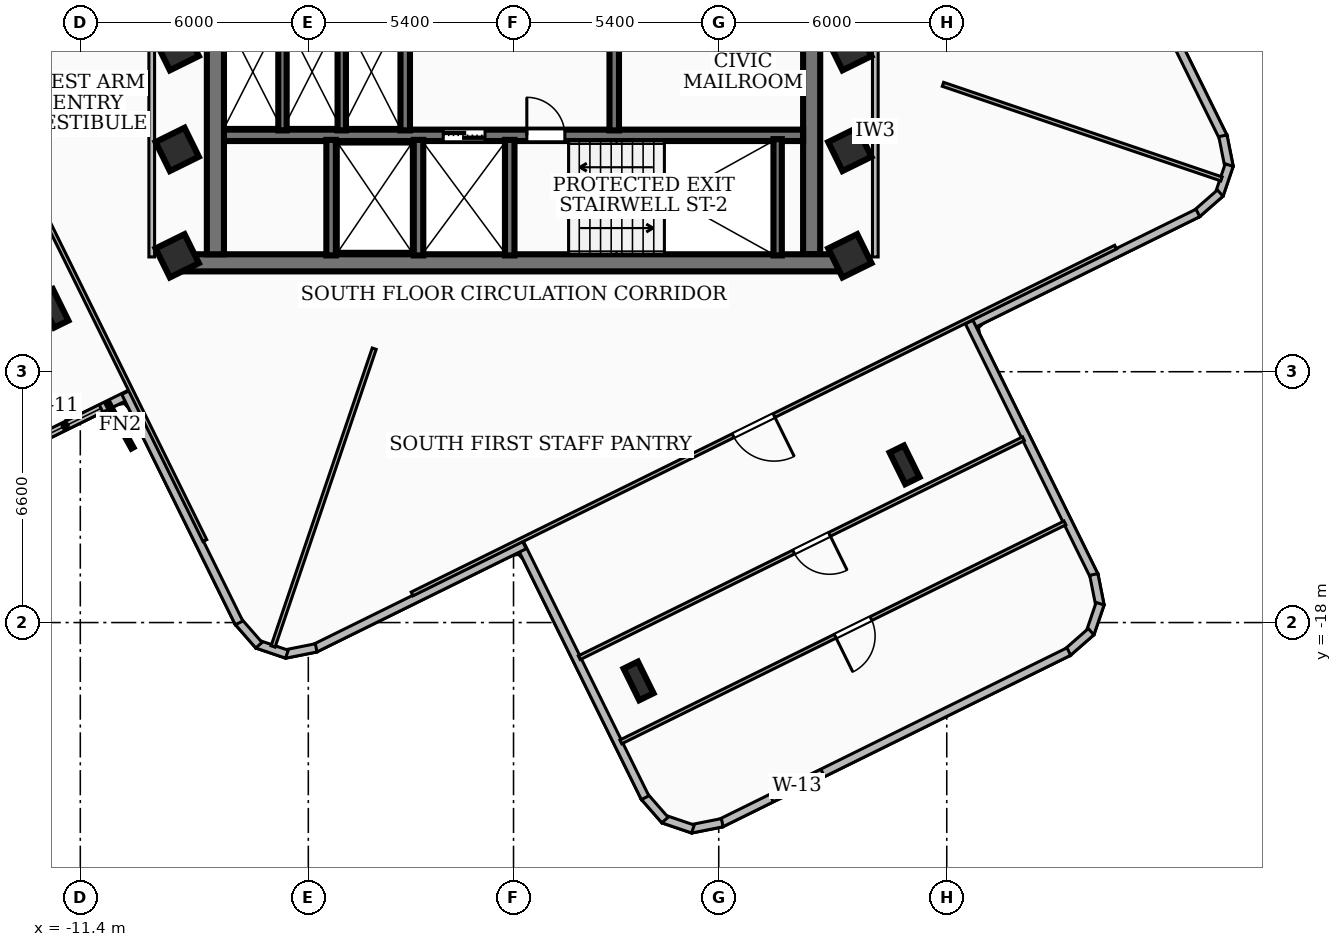
"""IFC4 building model, lengths in metres.
Left out: names, types, materials, properties, quantities, classifications, styles, units other than length and angle.
Written with IfcOpenShell. Run it as: python <this file> out.ifc"""

import sys

from ifc_helpers import new_model, si_unit, direction, frame, frame_2d, origin, origin_2d, place, context, subcontext, project, spatial, rectangle, i_section, extrude, element, fill, save


model = new_model("IFC4")
c1 = context("Model", 3, precision=1e-05, world=origin(), true_north=direction((0.0, 1.0)))
c2 = subcontext(c1, "Body", "Model", "MODEL_VIEW")
j1 = project(units=[si_unit("LENGTHUNIT", "METRE"), si_unit("PLANEANGLEUNIT", "RADIAN")], contexts=[c1])
p1 = place(None, origin())
s1 = spatial("IfcSite", under=j1, at=p1, CompositionType="ELEMENT")
p2 = place(p1, origin())
s2 = spatial("IfcBuilding", under=s1, at=p2, CompositionType="ELEMENT")
p3 = place(p2, frame((0.0, 0.0, 192.6)))
s3 = spatial("IfcBuildingStorey", under=s2, at=p3, CompositionType="ELEMENT", Elevation=192.6)
p4 = place(p3, frame((8.78, -8.535, 0.0), z_axis=(0.0, 0.0, 1.0), x_axis=(-1.0, 0.0, 0.0)))
e1 = element("IfcWall", 1, at=p4, inside=s3, PredefinedType="SHEAR", context=c2, shape_type="SweptSolid", body=[
    extrude(rectangle(XDim=17.56, YDim=0.45, at=frame_2d((8.78, 0.0))), origin(), (0.0, 0.0, 1.0), 3.2),
])
for number, where, z_axis, x_axis in (
    (2, (-7.845, -8.31, 0.0), (0.0, 0.0, 1.0), (0.0, 1.0, 0.0)),
    (3, (7.845, -1.975, 0.0), (0.0, 0.0, 1.0), (0.0, -1.0, 0.0)),
):
    element("IfcWall", number, at=place(p3, frame(where, z_axis=z_axis, x_axis=x_axis)), inside=s3, PredefinedType="SHEAR", context=c2, shape_type="SweptSolid", body=[
        extrude(rectangle(XDim=6.335, YDim=0.45, at=frame_2d((3.167, 0.0))), origin(), (0.0, 0.0, 1.0), 3.2),
    ])
p5 = place(p3, frame((-7.62, -5.18, 0.0), z_axis=(0.0, 0.0, 1.0), x_axis=(1.0, 0.0, 0.0)))
e4 = element("IfcWall", 4, at=p5, inside=s3, PredefinedType="SOLIDWALL", context=c2, shape_type="SweptSolid", body=[
    extrude(rectangle(XDim=15.24, YDim=0.3, at=frame_2d((7.62, 0.0))), origin(), (0.0, 0.0, 1.0), 3.2),
])
p6 = place(p5, frame((5.77, 0.0, 0.0)))
e5 = element("IfcOpeningElement", 5, at=p6, cuts=e4, PredefinedType="OPENING", context=c2, shape_type="SweptSolid", body=[
    extrude(rectangle(XDim=1.1, YDim=2.15, at=frame_2d((0.55, 1.075))), frame((0.0, 0.16, 0.0), z_axis=(0.0, -1.0, 0.0), x_axis=(1.0, 0.0, 0.0)), (0.0, 0.0, 1.0), 0.32),
])
p7 = place(p5, frame((7.97, 0.0, 0.0)))
e6 = element("IfcOpeningElement", 6, at=p7, cuts=e4, PredefinedType="OPENING", context=c2, shape_type="SweptSolid", body=[
    extrude(rectangle(XDim=1.0, YDim=2.1, at=frame_2d((0.5, 1.05))), frame((0.0, 0.16, 0.0), z_axis=(0.0, -1.0, 0.0), x_axis=(1.0, 0.0, 0.0)), (0.0, 0.0, 1.0), 0.32),
])
p8 = place(p3, frame((6.95, -8.34, 0.0), z_axis=(0.0, 0.0, 1.0), x_axis=(0.0, 1.0, 0.0)))
e7 = element("IfcWall", 7, at=p8, inside=s3, PredefinedType="SOLIDWALL", context=c2, shape_type="SweptSolid", body=[
    extrude(rectangle(XDim=3.06, YDim=0.22, at=frame_2d((1.53, 0.0))), origin(), (0.0, 0.0, 1.0), 3.2),
])
for number, where, z_axis, x_axis in (
    (8, (-0.1, -8.34, 0.0), (0.0, 0.0, 1.0), (0.0, 1.0, 0.0)),
    (9, (-2.5, -8.34, 0.0), (0.0, 0.0, 1.0), (0.0, 1.0, 0.0)),
    (10, (-4.8, -8.34, 0.0), (0.0, 0.0, 1.0), (0.0, 1.0, 0.0)),
):
    element("IfcWall", number, at=place(p3, frame(where, z_axis=z_axis, x_axis=x_axis)), inside=s3, PredefinedType="SOLIDWALL", context=c2, shape_type="SweptSolid", body=[
        extrude(rectangle(XDim=3.04, YDim=0.25, at=frame_2d((1.52, 0.0))), origin(), (0.0, 0.0, 1.0), 3.2),
    ])
for number, where, z_axis, x_axis in (
    (11, (-2.85, -5.05, 0.0), (0.0, 0.0, 1.0), (0.0, 1.0, 0.0)),
    (12, (2.65, -5.05, 0.0), (0.0, 0.0, 1.0), (0.0, 1.0, 0.0)),
):
    element("IfcWall", number, at=place(p3, frame(where, z_axis=z_axis, x_axis=x_axis)), inside=s3, PredefinedType="SOLIDWALL", context=c2, shape_type="SweptSolid", body=[
        extrude(rectangle(XDim=3.07, YDim=0.25, at=frame_2d((1.535, 0.0))), origin(), (0.0, 0.0, 1.0), 3.2),
    ])
for number, where, z_axis, x_axis in (
    (13, (-6.08, -5.05, 0.0), (0.0, 0.0, 1.0), (0.0, 1.0, 0.0)),
    (14, (-4.52, -5.05, 0.0), (0.0, 0.0, 1.0), (0.0, 1.0, 0.0)),
):
    element("IfcWall", number, at=place(p3, frame(where, z_axis=z_axis, x_axis=x_axis)), inside=s3, PredefinedType="SOLIDWALL", context=c2, shape_type="SweptSolid", body=[
        extrude(rectangle(XDim=3.07, YDim=0.22, at=frame_2d((1.535, 0.0))), origin(), (0.0, 0.0, 1.0), 3.2),
    ])
for number, where, z_axis, x_axis in (
    (15, (-8.85, -5.55, 0.0), (0.0, 0.0, 1.0), (0.897, 0.442, 0.0)),
    (16, (-8.85, -2.9, 0.0), (0.0, 0.0, 1.0), (0.897, 0.442, 0.0)),
    (17, (8.85, -5.55, 0.0), (0.0, 0.0, 1.0), (0.897, 0.442, 0.0)),
    (18, (8.85, -2.9, 0.0), (0.0, 0.0, 1.0), (0.897, 0.442, 0.0)),
    (19, (8.85, -8.35, 0.0), (0.0, 0.0, 1.0), (0.897, 0.442, 0.0)),
    (20, (-8.85, -8.35, 0.0), (0.0, 0.0, 1.0), (0.897, 0.442, 0.0)),
):
    element("IfcColumn", number, at=place(p3, frame(where, z_axis=z_axis, x_axis=x_axis)), inside=s3, PredefinedType="COLUMN", context=c2, shape_type="SweptSolid", body=[
        extrude(rectangle(XDim=0.85, YDim=0.85, at=origin_2d()), origin(), (0.0, 0.0, 1.0), 3.6),
    ])
for number, where, z_axis, x_axis in (
    (21, (-12.106, -9.731, 0.0), (0.0, 0.0, 1.0), (0.897, 0.442, 0.0)),
    (22, (3.29, -19.536, 0.0), (0.0, 0.0, 1.0), (0.897, 0.442, 0.0)),
    (23, (10.29, -13.85, 0.0), (0.0, 0.0, 1.0), (0.897, 0.442, 0.0)),
):
    element("IfcColumn", number, at=place(p3, frame(where, z_axis=z_axis, x_axis=x_axis)), inside=s3, PredefinedType="COLUMN", context=c2, shape_type="SweptSolid", body=[
        extrude(i_section(OverallWidth=0.418, OverallDepth=0.927, WebThickness=0.019, FlangeThickness=0.032, at=origin_2d()), origin(), (0.0, 0.0, 1.0), 3.6),
    ])
p9 = place(p3, frame((-10.092, -11.988, 0.0), z_axis=(0.0, 0.0, 1.0), x_axis=(-0.89699971925, -0.442031111649, 0.0)))
e24 = element("IfcWall", 24, at=p9, inside=s3, PredefinedType="SOLIDWALL", context=c2, shape_type="SweptSolid", body=[
    extrude(rectangle(XDim=9.058, YDim=0.22, at=frame_2d((4.529, 0.0))), origin(), (0.0, 0.0, 1.0), 3.2),
])
p10 = place(p9, frame((0.85, 0.0, 0.85)))
e25 = element("IfcOpeningElement", 25, at=p10, cuts=e24, PredefinedType="OPENING", context=c2, shape_type="SweptSolid", body=[
    extrude(rectangle(XDim=2.1, YDim=1.6, at=frame_2d((1.05, 0.8))), frame((0.0, 0.12, 0.0), z_axis=(0.0, -1.0, 0.0), x_axis=(1.0, 0.0, 0.0)), (0.0, 0.0, 1.0), 0.24),
])
p11 = place(p3, frame((15.96, 0.284, 0.0), z_axis=(0.0, 0.0, 1.0), x_axis=(0.442004580174, -0.897012793167, 0.0)))
e26 = element("IfcWall", 26, at=p11, inside=s3, PredefinedType="SOLIDWALL", context=c2, shape_type="SweptSolid", body=[
    extrude(rectangle(XDim=6.158, YDim=0.22, at=frame_2d((3.079, 0.0))), origin(), (0.0, 0.0, 1.0), 3.2),
])
p12 = place(p3, frame((18.666, -5.193, 0.0), z_axis=(0.0, 0.0, 1.0), x_axis=(0.19532881852, -0.980737810353, 0.0)))
e27 = element("IfcWall", 27, at=p12, inside=s3, PredefinedType="SOLIDWALL", context=c2, shape_type="SweptSolid", body=[
    extrude(rectangle(XDim=0.835, YDim=0.22, at=frame_2d((0.417, 0.0))), origin(), (0.0, 0.0, 1.0), 3.2),
])
p13 = place(p3, frame((18.832, -5.963, 0.0), z_axis=(0.0, 0.0, 1.0), x_axis=(-0.320509908962, -0.947245162699, 0.0)))
e28 = element("IfcWall", 28, at=p13, inside=s3, PredefinedType="SOLIDWALL", context=c2, shape_type="SweptSolid", body=[
    extrude(rectangle(XDim=0.82, YDim=0.22, at=frame_2d((0.41, 0.0))), origin(), (0.0, 0.0, 1.0), 3.2),
])
p14 = place(p3, frame((18.596, -6.7, 0.0), z_axis=(0.0, 0.0, 1.0), x_axis=(-0.752794227209, -0.658255916404, 0.0)))
e29 = element("IfcWall", 29, at=p14, inside=s3, PredefinedType="SOLIDWALL", context=c2, shape_type="SweptSolid", body=[
    extrude(rectangle(XDim=0.834, YDim=0.22, at=frame_2d((0.417, 0.0))), origin(), (0.0, 0.0, 1.0), 3.2),
])
p15 = place(p3, frame((18.009, -7.222, 0.0), z_axis=(0.0, 0.0, 1.0), x_axis=(-0.896927600032, -0.44217743079, 0.0)))
e30 = element("IfcWall", 30, at=p15, inside=s3, PredefinedType="SOLIDWALL", context=c2, shape_type="SweptSolid", body=[
    extrude(rectangle(XDim=6.758, YDim=0.22, at=frame_2d((3.379, 0.0))), origin(), (0.0, 0.0, 1.0), 3.2),
])
p16 = place(p3, frame((11.988, -10.092, 0.0), z_axis=(0.0, 0.0, 1.0), x_axis=(0.442047193251, -0.896991794243, 0.0)))
e31 = element("IfcWall", 31, at=p16, inside=s3, PredefinedType="SOLIDWALL", context=c2, shape_type="SweptSolid", body=[
    extrude(rectangle(XDim=7.458, YDim=0.22, at=frame_2d((3.729, 0.0))), origin(), (0.0, 0.0, 1.0), 3.2),
])
p17 = place(p3, frame((15.269, -16.735, 0.0), z_axis=(0.0, 0.0, 1.0), x_axis=(0.195047542382, -0.980793788832, 0.0)))
e32 = element("IfcWall", 32, at=p17, inside=s3, PredefinedType="SOLIDWALL", context=c2, shape_type="SweptSolid", body=[
    extrude(rectangle(XDim=0.835, YDim=0.22, at=frame_2d((0.417, 0.0))), origin(), (0.0, 0.0, 1.0), 3.2),
])
p18 = place(p3, frame((15.435, -17.505, 0.0), z_axis=(0.0, 0.0, 1.0), x_axis=(-0.322207018103, -0.94666923341, 0.0)))
e33 = element("IfcWall", 33, at=p18, inside=s3, PredefinedType="SOLIDWALL", context=c2, shape_type="SweptSolid", body=[
    extrude(rectangle(XDim=0.82, YDim=0.22, at=frame_2d((0.41, 0.0))), origin(), (0.0, 0.0, 1.0), 3.2),
])
p19 = place(p3, frame((15.198, -18.241, 0.0), z_axis=(0.0, 0.0, 1.0), x_axis=(-0.752286267629, -0.658836376907, 0.0)))
e34 = element("IfcWall", 34, at=p19, inside=s3, PredefinedType="SOLIDWALL", context=c2, shape_type="SweptSolid", body=[
    extrude(rectangle(XDim=0.833, YDim=0.22, at=frame_2d((0.417, 0.0))), origin(), (0.0, 0.0, 1.0), 3.2),
])
p20 = place(p3, frame((14.612, -18.763, 0.0), z_axis=(0.0, 0.0, 1.0), x_axis=(-0.896935503829, -0.442161398101, 0.0)))
e35 = element("IfcWall", 35, at=p20, inside=s3, PredefinedType="SOLIDWALL", context=c2, shape_type="SweptSolid", body=[
    extrude(rectangle(XDim=10.22, YDim=0.22, at=frame_2d((5.11, 0.0))), origin(), (0.0, 0.0, 1.0), 3.2),
])
p21 = place(p20, frame((7.222, 0.0, 0.85)))
e36 = element("IfcOpeningElement", 36, at=p21, cuts=e35, PredefinedType="OPENING", context=c2, shape_type="SweptSolid", body=[
    extrude(rectangle(XDim=1.5, YDim=1.8, at=frame_2d((0.75, 0.9))), frame((0.0, 0.12, 0.0), z_axis=(0.0, -1.0, 0.0), x_axis=(1.0, 0.0, 0.0)), (0.0, 0.0, 1.0), 0.24),
])
p22 = place(p3, frame((5.492, -23.266, 0.0), z_axis=(0.0, 0.0, 1.0), x_axis=(-0.980838211919, -0.194824028395, 0.0)))
e37 = element("IfcWall", 37, at=p22, inside=s3, PredefinedType="SOLIDWALL", context=c2, shape_type="SweptSolid", body=[
    extrude(rectangle(XDim=0.836, YDim=0.22, at=frame_2d((0.418, 0.0))), origin(), (0.0, 0.0, 1.0), 3.2),
])
p23 = place(p3, frame((4.721, -23.432, 0.0), z_axis=(0.0, 0.0, 1.0), x_axis=(-0.94709198428, 0.320962261507, 0.0)))
e38 = element("IfcWall", 38, at=p23, inside=s3, PredefinedType="SOLIDWALL", context=c2, shape_type="SweptSolid", body=[
    extrude(rectangle(XDim=0.819, YDim=0.22, at=frame_2d((0.41, 0.0))), origin(), (0.0, 0.0, 1.0), 3.2),
])
p24 = place(p3, frame((3.985, -23.196, 0.0), z_axis=(0.0, 0.0, 1.0), x_axis=(-0.658255916404, 0.752794227209, 0.0)))
e39 = element("IfcWall", 39, at=p24, inside=s3, PredefinedType="SOLIDWALL", context=c2, shape_type="SweptSolid", body=[
    extrude(rectangle(XDim=0.834, YDim=0.22, at=frame_2d((0.417, 0.0))), origin(), (0.0, 0.0, 1.0), 3.2),
])
p25 = place(p3, frame((3.463, -22.609, 0.0), z_axis=(0.0, 0.0, 1.0), x_axis=(-0.442099117248, 0.896966203671, 0.0)))
e40 = element("IfcWall", 40, at=p25, inside=s3, PredefinedType="SOLIDWALL", context=c2, shape_type="SweptSolid", body=[
    extrude(rectangle(XDim=7.457, YDim=0.22, at=frame_2d((3.729, 0.0))), origin(), (0.0, 0.0, 1.0), 3.2),
])
p26 = place(p3, frame((0.284, -15.96, 0.0), z_axis=(0.0, 0.0, 1.0), x_axis=(-0.897012793167, -0.442004580174, 0.0)))
e41 = element("IfcWall", 41, at=p26, inside=s3, PredefinedType="SOLIDWALL", context=c2, shape_type="SweptSolid", body=[
    extrude(rectangle(XDim=6.158, YDim=0.22, at=frame_2d((3.079, 0.0))), origin(), (0.0, 0.0, 1.0), 3.2),
])
p27 = place(p3, frame((-5.193, -18.666, 0.0), z_axis=(0.0, 0.0, 1.0), x_axis=(-0.980737810353, -0.19532881852, 0.0)))
e42 = element("IfcWall", 42, at=p27, inside=s3, PredefinedType="SOLIDWALL", context=c2, shape_type="SweptSolid", body=[
    extrude(rectangle(XDim=0.835, YDim=0.22, at=frame_2d((0.417, 0.0))), origin(), (0.0, 0.0, 1.0), 3.2),
])
p28 = place(p3, frame((-5.963, -18.832, 0.0), z_axis=(0.0, 0.0, 1.0), x_axis=(-0.947245162699, 0.320509908962, 0.0)))
e43 = element("IfcWall", 43, at=p28, inside=s3, PredefinedType="SOLIDWALL", context=c2, shape_type="SweptSolid", body=[
    extrude(rectangle(XDim=0.82, YDim=0.22, at=frame_2d((0.41, 0.0))), origin(), (0.0, 0.0, 1.0), 3.2),
])
p29 = place(p3, frame((-6.7, -18.596, 0.0), z_axis=(0.0, 0.0, 1.0), x_axis=(-0.658255916404, 0.752794227209, 0.0)))
e44 = element("IfcWall", 44, at=p29, inside=s3, PredefinedType="SOLIDWALL", context=c2, shape_type="SweptSolid", body=[
    extrude(rectangle(XDim=0.834, YDim=0.22, at=frame_2d((0.417, 0.0))), origin(), (0.0, 0.0, 1.0), 3.2),
])
p30 = place(p3, frame((-7.222, -18.009, 0.0), z_axis=(0.0, 0.0, 1.0), x_axis=(-0.44217743079, 0.896927600032, 0.0)))
e45 = element("IfcWall", 45, at=p30, inside=s3, PredefinedType="SOLIDWALL", context=c2, shape_type="SweptSolid", body=[
    extrude(rectangle(XDim=6.758, YDim=0.22, at=frame_2d((3.379, 0.0))), origin(), (0.0, 0.0, 1.0), 3.2),
])
p31 = place(p3, frame((-9.52, -8.38, 0.0), z_axis=(0.0, 0.0, 1.0), x_axis=(0.0, 1.0, 0.0)))
e46 = element("IfcWall", 46, at=p31, inside=s3, PredefinedType="PARTITIONING", context=c2, shape_type="SweptSolid", body=[
    extrude(rectangle(XDim=6.63, YDim=0.15, at=frame_2d((3.315, 0.0))), origin(), (0.0, 0.0, 1.0), 2.504),
])
p32 = place(p3, frame((9.52, -8.38, 0.0), z_axis=(0.0, 0.0, 1.0), x_axis=(0.0, 1.0, 0.0)))
e47 = element("IfcWall", 47, at=p32, inside=s3, PredefinedType="PARTITIONING", context=c2, shape_type="SweptSolid", body=[
    extrude(rectangle(XDim=6.63, YDim=0.15, at=frame_2d((3.315, 0.0))), origin(), (0.0, 0.0, 1.0), 3.2),
])
p33 = place(p3, frame((-3.666, -10.794, 0.0), z_axis=(0.0, 0.0, 1.0), x_axis=(-0.32157793417, -0.946883114357, 0.0)))
e48 = element("IfcWall", 48, at=p33, inside=s3, PredefinedType="PARTITIONING", context=c2, shape_type="SweptSolid", body=[
    extrude(rectangle(XDim=8.274, YDim=0.11, at=frame_2d((4.137, 0.0))), origin(), (0.0, 0.0, 1.0), 3.2),
])
p34 = place(p3, frame((11.3, -3.838, 0.0), z_axis=(0.0, 0.0, 1.0), x_axis=(0.946882857271, -0.321578691158, 0.0)))
e49 = element("IfcWall", 49, at=p34, inside=s3, PredefinedType="PARTITIONING", context=c2, shape_type="SweptSolid", body=[
    extrude(rectangle(XDim=7.74, YDim=0.11, at=frame_2d((3.87, 0.0))), origin(), (0.0, 0.0, 1.0), 3.2),
])
p35 = place(p3, frame((-8.122, -15.843, 0.0), z_axis=(0.0, 0.0, 1.0), x_axis=(-0.442129285211, 0.896951333774, 0.0)))
e50 = element("IfcWall", 50, at=p35, inside=s3, PredefinedType="PARTITIONING", context=c2, shape_type="SweptSolid", body=[
    extrude(rectangle(XDim=20.639, YDim=0.11, at=frame_2d((10.319, 0.0))), origin(), (0.0, 0.0, 1.0), 2.504),
])
p36 = place(p35, frame((10.02, 0.0, 0.0)))
e51 = element("IfcOpeningElement", 51, at=p36, cuts=e50, PredefinedType="OPENING", context=c2, shape_type="SweptSolid", body=[
    extrude(rectangle(XDim=1.2, YDim=2.1, at=frame_2d((0.6, 1.05))), frame((0.0, 0.065, 0.0), z_axis=(0.0, -1.0, 0.0), x_axis=(1.0, 0.0, 0.0)), (0.0, 0.0, 1.0), 0.13),
])
p37 = place(p3, frame((15.843, -8.122, 0.0), z_axis=(0.0, 0.0, 1.0), x_axis=(-0.896951333774, -0.442129285211, 0.0)))
e52 = element("IfcWall", 52, at=p37, inside=s3, PredefinedType="PARTITIONING", context=c2, shape_type="SweptSolid", body=[
    extrude(rectangle(XDim=20.639, YDim=0.11, at=frame_2d((10.319, 0.0))), origin(), (0.0, 0.0, 1.0), 2.504),
])
p38 = place(p37, frame((10.02, 0.0, 0.0)))
e53 = element("IfcOpeningElement", 53, at=p38, cuts=e52, PredefinedType="OPENING", context=c2, shape_type="SweptSolid", body=[
    extrude(rectangle(XDim=1.2, YDim=2.1, at=frame_2d((0.6, 1.05))), frame((0.0, 0.065, 0.0), z_axis=(0.0, -1.0, 0.0), x_axis=(1.0, 0.0, 0.0)), (0.0, 0.0, 1.0), 0.13),
])
p39 = place(p3, frame((13.418, -13.164, 0.0), z_axis=(0.0, 0.0, 1.0), x_axis=(-0.896946100231, -0.442139902385, 0.0)))
e54 = element("IfcWall", 54, at=p39, inside=s3, PredefinedType="PARTITIONING", context=c2, shape_type="SweptSolid", body=[
    extrude(rectangle(XDim=13.03, YDim=0.11, at=frame_2d((6.515, 0.0))), origin(), (0.0, 0.0, 1.0), 2.504),
])
p40 = place(p39, frame((5.69, 0.0, 0.0)))
e55 = element("IfcOpeningElement", 55, at=p40, cuts=e54, PredefinedType="OPENING", context=c2, shape_type="SweptSolid", body=[
    extrude(rectangle(XDim=1.05, YDim=2.08, at=frame_2d((0.525, 1.04))), frame((0.0, 0.065, 0.0), z_axis=(0.0, -1.0, 0.0), x_axis=(1.0, 0.0, 0.0)), (0.0, 0.0, 1.0), 0.13),
])
p41 = place(p3, frame((14.51, -15.379, 0.0), z_axis=(0.0, 0.0, 1.0), x_axis=(-0.896946100231, -0.442139902385, 0.0)))
e56 = element("IfcWall", 56, at=p41, inside=s3, PredefinedType="PARTITIONING", context=c2, shape_type="SweptSolid", body=[
    extrude(rectangle(XDim=13.03, YDim=0.11, at=frame_2d((6.515, 0.0))), origin(), (0.0, 0.0, 1.0), 3.2),
])
p42 = place(p41, frame((5.69, 0.0, 0.0)))
e57 = element("IfcOpeningElement", 57, at=p42, cuts=e56, PredefinedType="OPENING", context=c2, shape_type="SweptSolid", body=[
    extrude(rectangle(XDim=1.05, YDim=2.08, at=frame_2d((0.525, 1.04))), frame((0.0, 0.065, 0.0), z_axis=(0.0, -1.0, 0.0), x_axis=(1.0, 0.0, 0.0)), (0.0, 0.0, 1.0), 0.13),
])
p43 = place(p10, origin())
e58 = element("IfcWindow", 58, at=p43, inside=s3, PartitioningType="SINGLE_PANEL", PredefinedType="WINDOW", context=c2, shape_type="SweptSolid", body=[
    extrude(rectangle(XDim=2.1, YDim=1.6, at=frame_2d((1.05, 0.8))), frame((0.0, 0.03, 0.0), z_axis=(0.0, -1.0, 0.0), x_axis=(1.0, 0.0, 0.0)), (0.0, 0.0, 1.0), 0.06),
])
fill(e25, e58)
p44 = place(p21, origin())
e59 = element("IfcWindow", 59, at=p44, inside=s3, PartitioningType="SINGLE_PANEL", PredefinedType="WINDOW", context=c2, shape_type="SweptSolid", body=[
    extrude(rectangle(XDim=1.5, YDim=1.8, at=frame_2d((0.75, 0.9))), frame((0.0, 0.03, 0.0), z_axis=(0.0, -1.0, 0.0), x_axis=(1.0, 0.0, 0.0)), (0.0, 0.0, 1.0), 0.06),
])
fill(e36, e59)
p45 = place(p6, origin())
e60 = element("IfcDoor", 60, at=p45, inside=s3, OperationType="DOUBLE_DOOR_SLIDING", PredefinedType="DOOR", context=c2, shape_type="SweptSolid", body=[
    extrude(rectangle(XDim=1.1, YDim=2.15, at=frame_2d((0.55, 1.075))), frame((0.0, 0.025, 0.0), z_axis=(0.0, -1.0, 0.0), x_axis=(1.0, 0.0, 0.0)), (0.0, 0.0, 1.0), 0.05),
])
fill(e5, e60)
p46 = place(p7, origin())
e61 = element("IfcDoor", 61, at=p46, inside=s3, OperationType="SINGLE_SWING_LEFT", PredefinedType="DOOR", context=c2, shape_type="SweptSolid", body=[
    extrude(rectangle(XDim=1.0, YDim=2.1, at=frame_2d((0.5, 1.05))), frame((0.0, 0.025, 0.0), z_axis=(0.0, -1.0, 0.0), x_axis=(1.0, 0.0, 0.0)), (0.0, 0.0, 1.0), 0.05),
])
fill(e6, e61)
p47 = place(p38, origin())
e62 = element("IfcDoor", 62, at=p47, inside=s3, OperationType="SINGLE_SWING_LEFT", PredefinedType="DOOR", context=c2, shape_type="SweptSolid", body=[
    extrude(rectangle(XDim=1.2, YDim=2.1, at=frame_2d((0.6, 1.05))), frame((0.0, 0.025, 0.0), z_axis=(0.0, -1.0, 0.0), x_axis=(1.0, 0.0, 0.0)), (0.0, 0.0, 1.0), 0.05),
])
fill(e53, e62)
p48 = place(p40, origin())
e63 = element("IfcDoor", 63, at=p48, inside=s3, OperationType="SINGLE_SWING_LEFT", PredefinedType="DOOR", context=c2, shape_type="SweptSolid", body=[
    extrude(rectangle(XDim=1.05, YDim=2.08, at=frame_2d((0.525, 1.04))), frame((0.0, 0.025, 0.0), z_axis=(0.0, -1.0, 0.0), x_axis=(1.0, 0.0, 0.0)), (0.0, 0.0, 1.0), 0.05),
])
fill(e55, e63)
p49 = place(p42, origin())
e64 = element("IfcDoor", 64, at=p49, inside=s3, OperationType="SINGLE_SWING_RIGHT", PredefinedType="DOOR", context=c2, shape_type="SweptSolid", body=[
    extrude(rectangle(XDim=1.05, YDim=2.08, at=frame_2d((0.525, 1.04))), frame((0.0, 0.025, 0.0), z_axis=(0.0, -1.0, 0.0), x_axis=(1.0, 0.0, 0.0)), (0.0, 0.0, 1.0), 0.05),
])
fill(e57, e64)
save(model, sys.argv[1])
